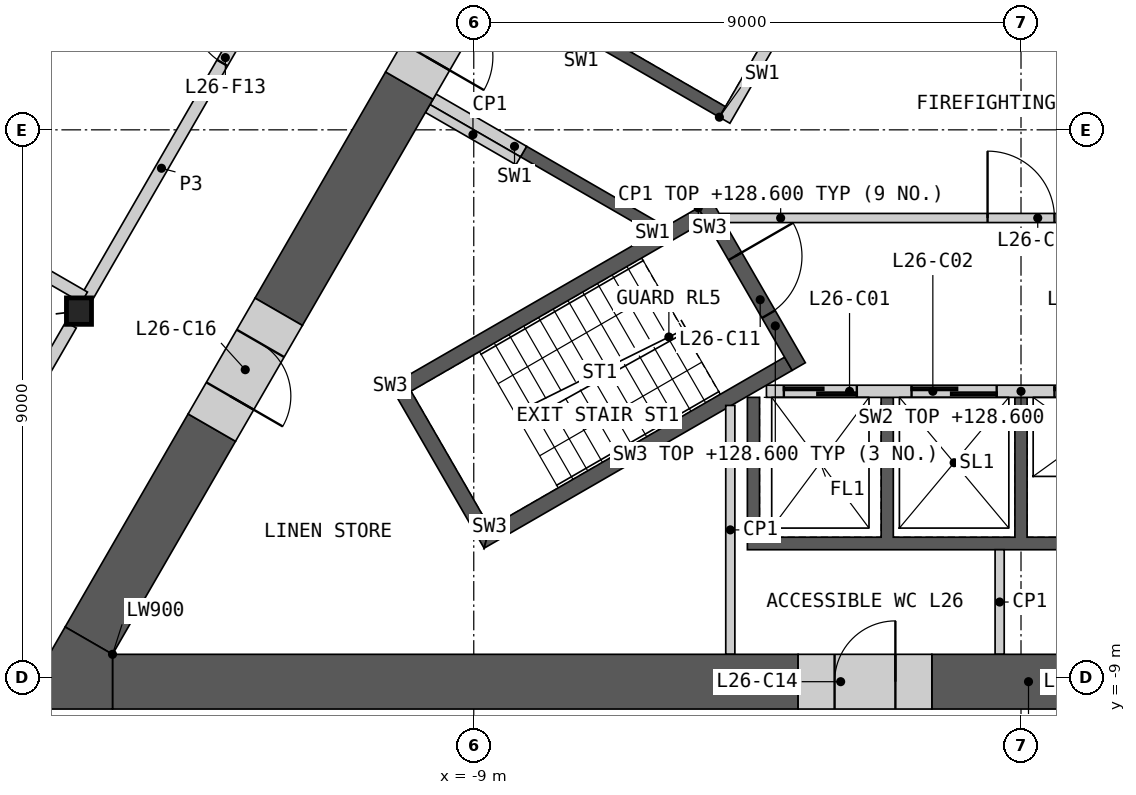
"""IFC4 building model, lengths in metres.
Left out: names, types, materials, properties, quantities, classifications, styles, units other than length and angle.
Written with IfcOpenShell. Run it as: python <this file> out.ifc"""

import sys

from ifc_helpers import new_model, si_unit, direction, frame, frame_2d, origin, origin_2d, place, context, subcontext, project, spatial, polyline, rectangle, i_section, outline, extrude, element, fill, save


model = new_model("IFC4")
c1 = context("Model", 3, precision=1e-05, world=origin(), true_north=direction((0.0, 1.0)))
c2 = subcontext(c1, "Body", "Model", "MODEL_VIEW")
j1 = project(units=[si_unit("LENGTHUNIT", "METRE"), si_unit("PLANEANGLEUNIT", "RADIAN")], contexts=[c1])
p1 = place(None, origin())
s1 = spatial("IfcSite", under=j1, at=p1, CompositionType="ELEMENT")
p2 = place(p1, origin())
s2 = spatial("IfcBuilding", under=s1, at=p2, CompositionType="ELEMENT")
p3 = place(p2, frame((0.0, 0.0, 124.8)))
s3 = spatial("IfcBuildingStorey", under=s2, at=p3, CompositionType="ELEMENT", Elevation=124.8)
p4 = place(p3, frame((-15.493, -2.982, 0.0), z_axis=(0.0, 0.0, 1.0), x_axis=(1.0, 0.0, 0.0)))
e1 = element("IfcColumn", 1, at=p4, inside=s3, PredefinedType="COLUMN", context=c2, shape_type="SweptSolid", body=[
    extrude(i_section(OverallWidth=0.412, OverallDepth=0.435, WebThickness=0.036, FlangeThickness=0.057, at=origin_2d()), origin(), (0.0, 0.0, 1.0), 4.2),
])
p5 = place(p3, origin())
e2 = element("IfcWall", 2, at=p5, inside=s3, PredefinedType="SHEAR", context=c2, shape_type="SweptSolid", body=[
    extrude(outline(polyline([(4.5, -4.4), (4.5, -6.906), (-4.5, -6.906), (-4.5, -4.4), (-4.3, -4.4), (-4.3, -6.7), (-2.3, -6.7), (-2.3, -4.4), (-2.1, -4.4), (-2.1, -6.7), (-0.1, -6.7), (-0.1, -4.4), (0.1, -4.4), (0.1, -6.7), (2.1, -6.7), (2.1, -4.4), (2.3, -4.4), (2.3, -6.7), (4.3, -6.7), (4.3, -4.4), (4.5, -4.4)])), origin(), (0.0, 0.0, 1.0), 3.8),
])
p6 = place(p3, frame((-4.187, -4.3, 0.0), z_axis=(0.0, 0.0, 1.0), x_axis=(1.0, 0.0, 0.0)))
e3 = element("IfcWall", 3, at=p6, inside=s3, PredefinedType="SOLIDWALL", context=c2, shape_type="SweptSolid", body=[
    extrude(rectangle(XDim=8.373, YDim=0.2, at=frame_2d((4.187, 0.0))), origin(), (0.0, 0.0, 1.0), 3.8),
])
p7 = place(p6, frame((0.287, 0.0, 0.0)))
e4 = element("IfcOpeningElement", 4, at=p7, cuts=e3, PredefinedType="OPENING", context=c2, shape_type="SweptSolid", body=[
    extrude(rectangle(XDim=1.2, YDim=2.1, at=frame_2d((0.6, 1.05))), frame((0.0, 0.11, 0.0), z_axis=(0.0, -1.0, 0.0), x_axis=(1.0, 0.0, 0.0)), (0.0, 0.0, 1.0), 0.22),
])
p8 = place(p6, frame((2.387, 0.0, 0.0)))
e5 = element("IfcOpeningElement", 5, at=p8, cuts=e3, PredefinedType="OPENING", context=c2, shape_type="SweptSolid", body=[
    extrude(rectangle(XDim=1.4, YDim=2.1, at=frame_2d((0.7, 1.05))), frame((0.0, 0.11, 0.0), z_axis=(0.0, -1.0, 0.0), x_axis=(1.0, 0.0, 0.0)), (0.0, 0.0, 1.0), 0.22),
])
p9 = place(p6, frame((4.737, 0.0, 0.0)))
e6 = element("IfcOpeningElement", 6, at=p9, cuts=e3, PredefinedType="OPENING", context=c2, shape_type="SweptSolid", body=[
    extrude(rectangle(XDim=1.1, YDim=2.1, at=frame_2d((0.55, 1.05))), frame((0.0, 0.11, 0.0), z_axis=(0.0, -1.0, 0.0), x_axis=(1.0, 0.0, 0.0)), (0.0, 0.0, 1.0), 0.22),
])
p10 = place(p6, frame((6.887, 0.0, 0.0)))
e7 = element("IfcOpeningElement", 7, at=p10, cuts=e3, PredefinedType="OPENING", context=c2, shape_type="SweptSolid", body=[
    extrude(rectangle(XDim=1.2, YDim=2.1, at=frame_2d((0.6, 1.05))), frame((0.0, 0.11, 0.0), z_axis=(0.0, -1.0, 0.0), x_axis=(1.0, 0.0, 0.0)), (0.0, 0.0, 1.0), 0.22),
])
p11 = place(p3, origin())
e8 = element("IfcWall", 8, at=p11, inside=s3, PredefinedType="SHEAR", context=c2, shape_type="SweptSolid", body=[
    extrude(outline(polyline([(-6.061, -1.697), (-8.231, -0.444), (-8.131, -0.271), (-5.96, -1.524), (-6.061, -1.697)])), origin(), (0.0, 0.0, 1.0), 3.8),
])
p12 = place(p3, origin())
e9 = element("IfcWall", 9, at=p12, inside=s3, PredefinedType="SHEAR", context=c2, shape_type="SweptSolid", body=[
    extrude(outline(polyline([(-4.96, 0.208), (-7.131, 1.461), (-3.731, 7.35), (-1.561, 6.097), (-1.66, 5.924), (-3.652, 7.074), (-5.752, 3.437), (-3.76, 2.287), (-3.861, 2.113), (-5.852, 3.263), (-6.852, 1.531), (-4.861, 0.381), (-4.96, 0.208)])), origin(), (0.0, 0.0, 1.0), 3.8),
])
p13 = place(p3, frame((-1.631, 5.776, 0.0), z_axis=(0.0, 0.0, 1.0), x_axis=(-0.499992876559, -0.866029516466, 0.0)))
e10 = element("IfcWall", 10, at=p13, inside=s3, PredefinedType="SOLIDWALL", context=c2, shape_type="SweptSolid", body=[
    extrude(rectangle(XDim=6.486, YDim=0.2, at=frame_2d((3.243, 0.0))), origin(), (0.0, 0.0, 1.0), 3.8),
])
p14 = place(p13, frame((1.537, 0.0, 0.0)))
e11 = element("IfcOpeningElement", 11, at=p14, cuts=e10, PredefinedType="OPENING", context=c2, shape_type="SweptSolid", body=[
    extrude(rectangle(XDim=0.9, YDim=2.1, at=frame_2d((0.45, 1.05))), frame((0.0, 0.11, 0.0), z_axis=(0.0, -1.0, 0.0), x_axis=(1.0, 0.0, 0.0)), (0.0, 0.0, 1.0), 0.22),
])
p15 = place(p3, frame((-8.181, -0.357, 0.0), z_axis=(0.0, 0.0, 1.0), x_axis=(-0.866024871741, 0.500000921525, 0.0)))
e12 = element("IfcWall", 12, at=p15, inside=s3, PredefinedType="SHEAR", context=c2, shape_type="SweptSolid", body=[
    extrude(rectangle(XDim=1.72, YDim=0.2, at=frame_2d((0.86, 0.0))), origin(), (0.0, 0.0, 1.0), 3.8),
])
p16 = place(p3, frame((-4.941, -1.45, 0.0), z_axis=(0.0, 0.0, 1.0), x_axis=(1.0, 0.0, 0.0)))
e13 = element("IfcWall", 13, at=p16, inside=s3, PredefinedType="PARTITIONING", context=c2, shape_type="SweptSolid", body=[
    extrude(rectangle(XDim=9.882, YDim=0.15, at=frame_2d((4.941, 0.0))), origin(), (0.0, 0.0, 1.0), 3.8),
])
p17 = place(p16, frame((4.391, 0.0, 0.0)))
e14 = element("IfcOpeningElement", 14, at=p17, cuts=e13, PredefinedType="OPENING", context=c2, shape_type="SweptSolid", body=[
    extrude(rectangle(XDim=1.1, YDim=2.1, at=frame_2d((0.55, 1.05))), frame((0.0, 0.085, 0.0), z_axis=(0.0, -1.0, 0.0), x_axis=(1.0, 0.0, 0.0)), (0.0, 0.0, 1.0), 0.17),
])
p18 = place(p3, origin())
e15 = element("IfcWall", 15, at=p18, inside=s3, PredefinedType="SHEAR", context=c2, shape_type="SweptSolid", body=[
    extrude(outline(polyline([(-5.307, -1.281), (-10.374, -4.206), (-10.032, -4.298), (-5.182, -1.498), (-5.307, -1.281)])), origin(), (0.0, 0.0, 1.0), 3.8),
])
p19 = place(p3, origin())
e16 = element("IfcWall", 16, at=p19, inside=s3, PredefinedType="SHEAR", context=c2, shape_type="SweptSolid", body=[
    extrude(outline(polyline([(-10.374, -4.206), (-8.83, -6.881), (-8.738, -6.539), (-10.032, -4.298), (-10.374, -4.206)])), origin(), (0.0, 0.0, 1.0), 3.8),
])
p20 = place(p3, origin())
e17 = element("IfcWall", 17, at=p20, inside=s3, PredefinedType="SHEAR", context=c2, shape_type="SweptSolid", body=[
    extrude(outline(polyline([(-8.738, -6.539), (-8.83, -6.881), (-3.763, -3.956), (-3.888, -3.739), (-8.738, -6.539)])), origin(), (0.0, 0.0, 1.0), 3.8),
])
p21 = place(p3, frame((-5.199, -1.219, 0.0), z_axis=(0.0, 0.0, 1.0), x_axis=(0.499982516597, -0.866035497597, 0.0)))
e18 = element("IfcWall", 18, at=p21, inside=s3, PredefinedType="SHEAR", context=c2, shape_type="SweptSolid", body=[
    extrude(rectangle(XDim=3.088, YDim=0.25, at=frame_2d((1.544, 0.0))), origin(), (0.0, 0.0, 1.0), 3.8),
])
p22 = place(p21, frame((0.994, 0.0, 0.0)))
e19 = element("IfcOpeningElement", 19, at=p22, cuts=e18, PredefinedType="OPENING", context=c2, shape_type="SweptSolid", body=[
    extrude(rectangle(XDim=1.1, YDim=2.1, at=frame_2d((0.55, 1.05))), frame((0.0, 0.135, 0.0), z_axis=(0.0, -1.0, 0.0), x_axis=(1.0, 0.0, 0.0)), (0.0, 0.0, 1.0), 0.27),
])
for number, where, z_axis, x_axis in (
    (20, (-8.268, -0.509, 0.0), (0.0, 0.0, 1.0), (-0.866, 0.5, 0.0)),
    (21, (-0.351, -8.626, 0.0), (0.0, 0.0, 1.0), (0.0, 1.0, 0.0)),
):
    element("IfcWall", number, at=place(p3, frame(where, z_axis=z_axis, x_axis=x_axis)), inside=s3, PredefinedType="PARTITIONING", context=c2, shape_type="SweptSolid", body=[
        extrude(rectangle(XDim=1.72, YDim=0.15, at=frame_2d((0.86, 0.0))), origin(), (0.0, 0.0, 1.0), 3.8),
    ])
p23 = place(p3, frame((-4.781, -8.626, 0.0), z_axis=(0.0, 0.0, 1.0), x_axis=(0.0, 1.0, 0.0)))
e22 = element("IfcWall", 22, at=p23, inside=s3, PredefinedType="PARTITIONING", context=c2, shape_type="SweptSolid", body=[
    extrude(rectangle(XDim=4.093, YDim=0.15, at=frame_2d((2.047, 0.0))), origin(), (0.0, 0.0, 1.0), 3.8),
])
p24 = place(p3, frame((-14.941, -9.076, 0.0), z_axis=(0.0, 0.0, 1.0), x_axis=(1.0, 0.0, 0.0)))
e23 = element("IfcWall", 23, at=p24, inside=s3, PredefinedType="SHEAR", context=c2, shape_type="SweptSolid", body=[
    extrude(rectangle(XDim=11.275, YDim=0.9, at=frame_2d((5.638, 0.0))), origin(), (0.0, 0.0, 1.0), 3.8),
])
p25 = place(p3, frame((-1.466, -9.076, 0.0), z_axis=(0.0, 0.0, 1.0), x_axis=(1.0, 0.0, 0.0)))
e24 = element("IfcWall", 24, at=p25, inside=s3, PredefinedType="SHEAR", context=c2, shape_type="SweptSolid", body=[
    extrude(rectangle(XDim=3.179, YDim=0.9, at=frame_2d((1.589, 0.0))), origin(), (0.0, 0.0, 1.0), 3.8),
])
p26 = place(p3, frame((-10.06, 0.728, 0.0), z_axis=(0.0, 0.0, 1.0), x_axis=(-0.499996331799, -0.866027521611, 0.0)))
e25 = element("IfcWall", 25, at=p26, inside=s3, PredefinedType="SHEAR", context=c2, shape_type="SweptSolid", body=[
    extrude(rectangle(XDim=4.295, YDim=0.9, at=frame_2d((2.148, 0.0))), origin(), (0.0, 0.0, 1.0), 3.8),
])
p27 = place(p3, frame((-13.308, -4.898, 0.0), z_axis=(0.0, 0.0, 1.0), x_axis=(-0.499974938593, -0.866039872511, 0.0)))
e26 = element("IfcWall", 26, at=p27, inside=s3, PredefinedType="SHEAR", context=c2, shape_type="SweptSolid", body=[
    extrude(rectangle(XDim=4.046, YDim=0.9, at=frame_2d((2.023, 0.0))), origin(), (0.0, 0.0, 1.0), 3.8),
])
p28 = place(p3, origin())
e27 = element("IfcWall", 27, at=p28, inside=s3, PredefinedType="SHEAR", context=c2, shape_type="SweptSolid", body=[
    extrude(outline(polyline([(-14.941, -8.626), (-14.941, -9.526), (-16.5, -9.526), (-15.721, -8.176), (-14.941, -8.626)])), origin(), (0.0, 0.0, 1.0), 3.8),
])
p29 = place(p3, frame((-3.666, -9.076, 0.0), z_axis=(0.0, 0.0, 1.0), x_axis=(1.0, 0.0, 0.0)))
e28 = element("IfcWall", 28, at=p29, inside=s3, PredefinedType="SHEAR", context=c2, shape_type="SweptSolid", body=[
    extrude(rectangle(XDim=2.2, YDim=0.9, at=frame_2d((1.1, 0.0))), origin(), (0.0, 0.0, 1.0), 3.8),
])
p30 = place(p29, frame((0.6, 0.0, 0.0)))
e29 = element("IfcOpeningElement", 29, at=p30, cuts=e28, PredefinedType="OPENING", context=c2, shape_type="SweptSolid", body=[
    extrude(rectangle(XDim=1.0, YDim=2.1, at=frame_2d((0.5, 1.05))), frame((0.0, 0.46, 0.0), z_axis=(0.0, -1.0, 0.0), x_axis=(1.0, 0.0, 0.0)), (0.0, 0.0, 1.0), 0.92),
])
p31 = place(p3, frame((-12.208, -2.992, 0.0), z_axis=(0.0, 0.0, 1.0), x_axis=(-0.50002983664, -0.866008176907, 0.0)))
e30 = element("IfcWall", 30, at=p31, inside=s3, PredefinedType="SHEAR", context=c2, shape_type="SweptSolid", body=[
    extrude(rectangle(XDim=2.2, YDim=0.9, at=frame_2d((1.1, 0.0))), origin(), (0.0, 0.0, 1.0), 3.8),
])
p32 = place(p31, frame((0.6, 0.0, 0.0)))
e31 = element("IfcOpeningElement", 31, at=p32, cuts=e30, PredefinedType="OPENING", context=c2, shape_type="SweptSolid", body=[
    extrude(rectangle(XDim=1.0, YDim=2.1, at=frame_2d((0.5, 1.05))), frame((0.0, 0.46, 0.0), z_axis=(0.0, -1.0, 0.0), x_axis=(1.0, 0.0, 0.0)), (0.0, 0.0, 1.0), 0.92),
])
p33 = place(p3, frame((-8.96, 2.633, 0.0), z_axis=(0.0, 0.0, 1.0), x_axis=(-0.50002983664, -0.866008176907, 0.0)))
e32 = element("IfcWall", 32, at=p33, inside=s3, PredefinedType="SHEAR", context=c2, shape_type="SweptSolid", body=[
    extrude(rectangle(XDim=2.2, YDim=0.9, at=frame_2d((1.1, 0.0))), origin(), (0.0, 0.0, 1.0), 3.8),
])
p34 = place(p33, frame((0.55, 0.0, 0.0)))
e33 = element("IfcOpeningElement", 33, at=p34, cuts=e32, PredefinedType="OPENING", context=c2, shape_type="SweptSolid", body=[
    extrude(rectangle(XDim=1.1, YDim=2.1, at=frame_2d((0.55, 1.05))), frame((0.0, 0.46, 0.0), z_axis=(0.0, -1.0, 0.0), x_axis=(1.0, 0.0, 0.0)), (0.0, 0.0, 1.0), 0.92),
])
p35 = place(p3, frame((-15.361, -2.754, 0.0), z_axis=(0.0, 0.0, 1.0), x_axis=(0.500004141693, 0.866023012564, 0.0)))
e34 = element("IfcWall", 34, at=p35, inside=s3, PredefinedType="PARTITIONING", context=c2, shape_type="SweptSolid", body=[
    extrude(rectangle(XDim=9.803, YDim=0.2, at=frame_2d((4.902, 0.0))), origin(), (0.0, 0.0, 1.0), 3.8),
])
p36 = place(p35, frame((4.452, 0.0, 0.0)))
e35 = element("IfcOpeningElement", 35, at=p36, cuts=e34, PredefinedType="OPENING", context=c2, shape_type="SweptSolid", body=[
    extrude(rectangle(XDim=1.0, YDim=2.1, at=frame_2d((0.5, 1.05))), frame((0.0, 0.11, 0.0), z_axis=(0.0, -1.0, 0.0), x_axis=(1.0, 0.0, 0.0)), (0.0, 0.0, 1.0), 0.22),
])
p37 = place(p3, frame((-18.744, -8.613, 0.0), z_axis=(0.0, 0.0, 1.0), x_axis=(0.499997920671, 0.866026604282, 0.0)))
e36 = element("IfcWall", 36, at=p37, inside=s3, PredefinedType="PARTITIONING", context=c2, shape_type="SweptSolid", body=[
    extrude(rectangle(XDim=6.24, YDim=0.2, at=frame_2d((3.12, 0.0))), origin(), (0.0, 0.0, 1.0), 3.8),
])
p38 = place(p37, frame((2.67, 0.0, 0.0)))
e37 = element("IfcOpeningElement", 37, at=p38, cuts=e36, PredefinedType="OPENING", context=c2, shape_type="SweptSolid", body=[
    extrude(rectangle(XDim=1.0, YDim=2.1, at=frame_2d((0.5, 1.05))), frame((0.0, 0.11, 0.0), z_axis=(0.0, -1.0, 0.0), x_axis=(1.0, 0.0, 0.0)), (0.0, 0.0, 1.0), 0.22),
])
p39 = place(p3, frame((-26.636, 3.731, 0.0), z_axis=(0.0, 0.0, 1.0), x_axis=(0.866024473704, -0.500001610943, 0.0)))
e38 = element("IfcWall", 38, at=p39, inside=s3, PredefinedType="PARTITIONING", context=c2, shape_type="SweptSolid", body=[
    extrude(rectangle(XDim=12.971, YDim=0.2, at=frame_2d((6.485, 0.0))), origin(), (0.0, 0.0, 1.0), 2.885),
])
p40 = place(p7, origin())
e39 = element("IfcDoor", 39, at=p40, inside=s3, OperationType="SLIDING_TO_LEFT", PredefinedType="DOOR", context=c2, shape_type="SweptSolid", body=[
    extrude(rectangle(XDim=1.2, YDim=2.1, at=frame_2d((0.6, 1.05))), frame((0.0, 0.025, 0.0), z_axis=(0.0, -1.0, 0.0), x_axis=(1.0, 0.0, 0.0)), (0.0, 0.0, 1.0), 0.05),
])
fill(e4, e39)
p41 = place(p8, origin())
e40 = element("IfcDoor", 40, at=p41, inside=s3, OperationType="SLIDING_TO_LEFT", PredefinedType="DOOR", context=c2, shape_type="SweptSolid", body=[
    extrude(rectangle(XDim=1.4, YDim=2.1, at=frame_2d((0.7, 1.05))), frame((0.0, 0.025, 0.0), z_axis=(0.0, -1.0, 0.0), x_axis=(1.0, 0.0, 0.0)), (0.0, 0.0, 1.0), 0.05),
])
fill(e5, e40)
p42 = place(p9, origin())
e41 = element("IfcDoor", 41, at=p42, inside=s3, OperationType="SLIDING_TO_LEFT", PredefinedType="DOOR", context=c2, shape_type="SweptSolid", body=[
    extrude(rectangle(XDim=1.1, YDim=2.1, at=frame_2d((0.55, 1.05))), frame((0.0, 0.025, 0.0), z_axis=(0.0, -1.0, 0.0), x_axis=(1.0, 0.0, 0.0)), (0.0, 0.0, 1.0), 0.05),
])
fill(e6, e41)
p43 = place(p17, origin())
e42 = element("IfcDoor", 42, at=p43, inside=s3, OperationType="SINGLE_SWING_LEFT", PredefinedType="DOOR", context=c2, shape_type="SweptSolid", body=[
    extrude(rectangle(XDim=1.1, YDim=2.1, at=frame_2d((0.55, 1.05))), frame((0.0, 0.025, 0.0), z_axis=(0.0, -1.0, 0.0), x_axis=(1.0, 0.0, 0.0)), (0.0, 0.0, 1.0), 0.05),
])
fill(e14, e42)
p44 = place(p22, origin())
e43 = element("IfcDoor", 43, at=p44, inside=s3, OperationType="SINGLE_SWING_LEFT", PredefinedType="DOOR", context=c2, shape_type="SweptSolid", body=[
    extrude(rectangle(XDim=1.1, YDim=2.1, at=frame_2d((0.55, 1.05))), frame((0.0, 0.025, 0.0), z_axis=(0.0, -1.0, 0.0), x_axis=(1.0, 0.0, 0.0)), (0.0, 0.0, 1.0), 0.05),
])
fill(e19, e43)
p45 = place(p30, origin())
e44 = element("IfcDoor", 44, at=p45, inside=s3, OperationType="SINGLE_SWING_RIGHT", PredefinedType="DOOR", context=c2, shape_type="SweptSolid", body=[
    extrude(rectangle(XDim=1.0, YDim=2.1, at=frame_2d((0.5, 1.05))), frame((0.0, 0.205, 0.0), z_axis=(0.0, -1.0, 0.0), x_axis=(1.0, 0.0, 0.0)), (0.0, 0.0, 1.0), 0.05),
])
fill(e29, e44)
p46 = place(p32, origin())
e45 = element("IfcDoor", 45, at=p46, inside=s3, OperationType="SINGLE_SWING_RIGHT", PredefinedType="DOOR", context=c2, shape_type="SweptSolid", body=[
    extrude(rectangle(XDim=1.0, YDim=2.1, at=frame_2d((0.5, 1.05))), frame((0.0, 0.205, 0.0), z_axis=(0.0, -1.0, 0.0), x_axis=(1.0, 0.0, 0.0)), (0.0, 0.0, 1.0), 0.05),
])
fill(e31, e45)
p47 = place(p34, origin())
e46 = element("IfcDoor", 46, at=p47, inside=s3, OperationType="SINGLE_SWING_RIGHT", PredefinedType="DOOR", context=c2, shape_type="SweptSolid", body=[
    extrude(rectangle(XDim=1.1, YDim=2.1, at=frame_2d((0.55, 1.05))), frame((0.0, 0.205, 0.0), z_axis=(0.0, -1.0, 0.0), x_axis=(1.0, 0.0, 0.0)), (0.0, 0.0, 1.0), 0.05),
])
fill(e33, e46)
p48 = place(p36, origin())
e47 = element("IfcDoor", 47, at=p48, inside=s3, OperationType="SINGLE_SWING_RIGHT", PredefinedType="DOOR", context=c2, shape_type="SweptSolid", body=[
    extrude(rectangle(XDim=1.0, YDim=2.1, at=frame_2d((0.5, 1.05))), frame((0.0, 0.025, 0.0), z_axis=(0.0, -1.0, 0.0), x_axis=(1.0, 0.0, 0.0)), (0.0, 0.0, 1.0), 0.05),
])
fill(e35, e47)
save(model, sys.argv[1])
